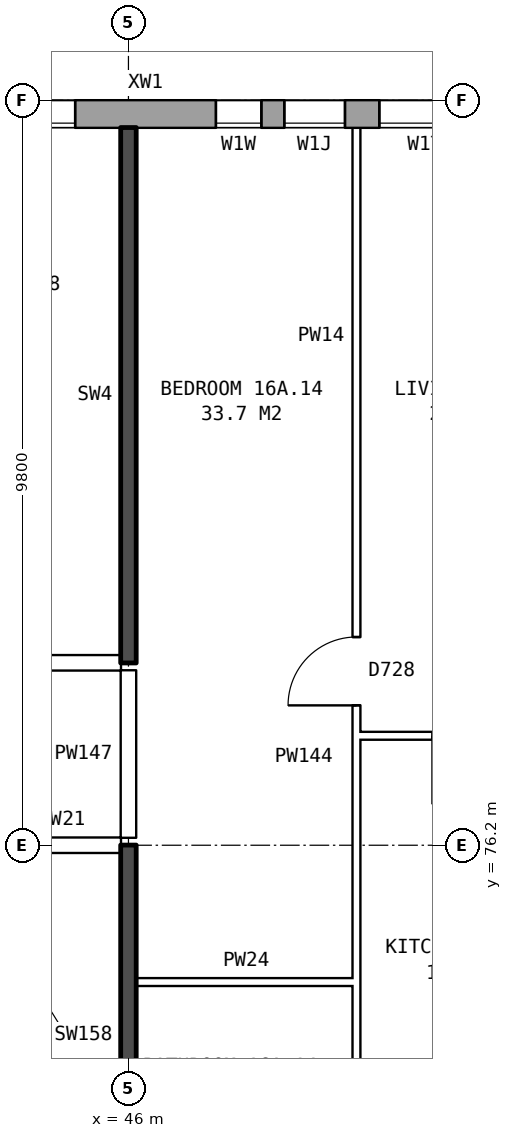
"""IFC4 building model, lengths in metres.
Left out: names, types, materials, properties, quantities, classifications, styles, units other than length and angle.
Written with IfcOpenShell. Run it as: python <this file> out.ifc"""

import sys

from ifc_helpers import new_model, si_unit, direction, frame, frame_2d, origin, place, context, subcontext, project, spatial, rectangle, extrude, element, fill, save


model = new_model("IFC4")
c1 = context("Model", 3, precision=1e-05, world=origin(), true_north=direction((0.0, 1.0)))
c2 = subcontext(c1, "Body", "Model", "MODEL_VIEW")
j1 = project(units=[si_unit("LENGTHUNIT", "METRE"), si_unit("PLANEANGLEUNIT", "RADIAN")], contexts=[c1])
p1 = place(None, origin())
s1 = spatial("IfcSite", under=j1, at=p1, CompositionType="ELEMENT")
p2 = place(p1, origin())
s2 = spatial("IfcBuilding", under=s1, at=p2, CompositionType="ELEMENT")
p3 = place(p2, frame((0.0, 0.0, 59.8)))
s3 = spatial("IfcBuildingStorey", under=s2, at=p3, CompositionType="ELEMENT", Elevation=59.8)
p4 = place(p3, frame((72.925, 85.82, 0.0), z_axis=(0.0, 0.0, 1.0), x_axis=(-1.0, 0.0, 0.0)))
e1 = element("IfcWall", 1, at=p4, inside=s3, PredefinedType="STANDARD", context=c2, shape_type="SweptSolid", body=[
    extrude(rectangle(XDim=48.351, YDim=0.36, at=frame_2d((24.175, 0.0))), origin(), (0.0, 0.0, 1.0), 2.85),
])
p5 = place(p4, frame((0.625, 0.0, 0.8)))
e2 = element("IfcOpeningElement", 2, at=p5, cuts=e1, PredefinedType="OPENING", context=c2, shape_type="SweptSolid", body=[
    extrude(rectangle(XDim=1.6, YDim=1.8, at=frame_2d((0.8, 0.9))), frame((0.0, 0.19, 0.0), z_axis=(0.0, -1.0, 0.0), x_axis=(1.0, 0.0, 0.0)), (0.0, 0.0, 1.0), 0.38),
])
p6 = place(p4, frame((3.625, 0.0, 0.8)))
e3 = element("IfcOpeningElement", 3, at=p6, cuts=e1, PredefinedType="OPENING", context=c2, shape_type="SweptSolid", body=[
    extrude(rectangle(XDim=1.6, YDim=1.8, at=frame_2d((0.8, 0.9))), frame((0.0, 0.19, 0.0), z_axis=(0.0, -1.0, 0.0), x_axis=(1.0, 0.0, 0.0)), (0.0, 0.0, 1.0), 0.38),
])
p7 = place(p4, frame((6.625, 0.0, 0.8)))
e4 = element("IfcOpeningElement", 4, at=p7, cuts=e1, PredefinedType="OPENING", context=c2, shape_type="SweptSolid", body=[
    extrude(rectangle(XDim=1.6, YDim=1.8, at=frame_2d((0.8, 0.9))), frame((0.0, 0.19, 0.0), z_axis=(0.0, -1.0, 0.0), x_axis=(1.0, 0.0, 0.0)), (0.0, 0.0, 1.0), 0.38),
])
p8 = place(p4, frame((9.625, 0.0, 0.8)))
e5 = element("IfcOpeningElement", 5, at=p8, cuts=e1, PredefinedType="OPENING", context=c2, shape_type="SweptSolid", body=[
    extrude(rectangle(XDim=1.6, YDim=1.8, at=frame_2d((0.8, 0.9))), frame((0.0, 0.19, 0.0), z_axis=(0.0, -1.0, 0.0), x_axis=(1.0, 0.0, 0.0)), (0.0, 0.0, 1.0), 0.38),
])
p9 = place(p4, frame((12.625, 0.0, 0.8)))
e6 = element("IfcOpeningElement", 6, at=p9, cuts=e1, PredefinedType="OPENING", context=c2, shape_type="SweptSolid", body=[
    extrude(rectangle(XDim=1.6, YDim=1.8, at=frame_2d((0.8, 0.9))), frame((0.0, 0.19, 0.0), z_axis=(0.0, -1.0, 0.0), x_axis=(1.0, 0.0, 0.0)), (0.0, 0.0, 1.0), 0.38),
])
p10 = place(p4, frame((15.625, 0.0, 0.8)))
e7 = element("IfcOpeningElement", 7, at=p10, cuts=e1, PredefinedType="OPENING", context=c2, shape_type="SweptSolid", body=[
    extrude(rectangle(XDim=1.6, YDim=1.8, at=frame_2d((0.8, 0.9))), frame((0.0, 0.19, 0.0), z_axis=(0.0, -1.0, 0.0), x_axis=(1.0, 0.0, 0.0)), (0.0, 0.0, 1.0), 0.38),
])
p11 = place(p4, frame((18.625, 0.0, 0.8)))
e8 = element("IfcOpeningElement", 8, at=p11, cuts=e1, PredefinedType="OPENING", context=c2, shape_type="SweptSolid", body=[
    extrude(rectangle(XDim=1.6, YDim=1.8, at=frame_2d((0.8, 0.9))), frame((0.0, 0.19, 0.0), z_axis=(0.0, -1.0, 0.0), x_axis=(1.0, 0.0, 0.0)), (0.0, 0.0, 1.0), 0.38),
])
p12 = place(p4, frame((21.125, 0.0, 1.65)))
e9 = element("IfcOpeningElement", 9, at=p12, cuts=e1, PredefinedType="OPENING", context=c2, shape_type="SweptSolid", body=[
    extrude(rectangle(XDim=0.8, YDim=0.9, at=frame_2d((0.4, 0.45))), frame((0.0, 0.19, 0.0), z_axis=(0.0, -1.0, 0.0), x_axis=(1.0, 0.0, 0.0)), (0.0, 0.0, 1.0), 0.38),
])
p13 = place(p4, frame((24.075, 0.0, 0.25)))
e10 = element("IfcOpeningElement", 10, at=p13, cuts=e1, PredefinedType="OPENING", context=c2, shape_type="SweptSolid", body=[
    extrude(rectangle(XDim=0.8, YDim=1.5, at=frame_2d((0.4, 0.75))), frame((0.0, 0.19, 0.0), z_axis=(0.0, -1.0, 0.0), x_axis=(1.0, 0.0, 0.0)), (0.0, 0.0, 1.0), 0.38),
])
p14 = place(p4, frame((27.625, 0.0, 0.8)))
e11 = element("IfcOpeningElement", 11, at=p14, cuts=e1, PredefinedType="OPENING", context=c2, shape_type="SweptSolid", body=[
    extrude(rectangle(XDim=1.6, YDim=1.8, at=frame_2d((0.8, 0.9))), frame((0.0, 0.19, 0.0), z_axis=(0.0, -1.0, 0.0), x_axis=(1.0, 0.0, 0.0)), (0.0, 0.0, 1.0), 0.38),
])
p15 = place(p4, frame((30.625, 0.0, 0.8)))
e12 = element("IfcOpeningElement", 12, at=p15, cuts=e1, PredefinedType="OPENING", context=c2, shape_type="SweptSolid", body=[
    extrude(rectangle(XDim=1.6, YDim=1.8, at=frame_2d((0.8, 0.9))), frame((0.0, 0.19, 0.0), z_axis=(0.0, -1.0, 0.0), x_axis=(1.0, 0.0, 0.0)), (0.0, 0.0, 1.0), 0.38),
])
p16 = place(p4, frame((33.625, 0.0, 0.8)))
e13 = element("IfcOpeningElement", 13, at=p16, cuts=e1, PredefinedType="OPENING", context=c2, shape_type="SweptSolid", body=[
    extrude(rectangle(XDim=1.6, YDim=1.8, at=frame_2d((0.8, 0.9))), frame((0.0, 0.19, 0.0), z_axis=(0.0, -1.0, 0.0), x_axis=(1.0, 0.0, 0.0)), (0.0, 0.0, 1.0), 0.38),
])
p17 = place(p4, frame((36.625, 0.0, 0.8)))
e14 = element("IfcOpeningElement", 14, at=p17, cuts=e1, PredefinedType="OPENING", context=c2, shape_type="SweptSolid", body=[
    extrude(rectangle(XDim=1.6, YDim=1.8, at=frame_2d((0.8, 0.9))), frame((0.0, 0.19, 0.0), z_axis=(0.0, -1.0, 0.0), x_axis=(1.0, 0.0, 0.0)), (0.0, 0.0, 1.0), 0.38),
])
p18 = place(p4, frame((39.625, 0.0, 0.8)))
e15 = element("IfcOpeningElement", 15, at=p18, cuts=e1, PredefinedType="OPENING", context=c2, shape_type="SweptSolid", body=[
    extrude(rectangle(XDim=1.6, YDim=1.8, at=frame_2d((0.8, 0.9))), frame((0.0, 0.19, 0.0), z_axis=(0.0, -1.0, 0.0), x_axis=(1.0, 0.0, 0.0)), (0.0, 0.0, 1.0), 0.38),
])
p19 = place(p4, frame((42.625, 0.0, 0.8)))
e16 = element("IfcOpeningElement", 16, at=p19, cuts=e1, PredefinedType="OPENING", context=c2, shape_type="SweptSolid", body=[
    extrude(rectangle(XDim=1.6, YDim=1.8, at=frame_2d((0.8, 0.9))), frame((0.0, 0.19, 0.0), z_axis=(0.0, -1.0, 0.0), x_axis=(1.0, 0.0, 0.0)), (0.0, 0.0, 1.0), 0.38),
])
p20 = place(p4, frame((45.625, 0.0, 0.8)))
e17 = element("IfcOpeningElement", 17, at=p20, cuts=e1, PredefinedType="OPENING", context=c2, shape_type="SweptSolid", body=[
    extrude(rectangle(XDim=1.6, YDim=1.8, at=frame_2d((0.8, 0.9))), frame((0.0, 0.19, 0.0), z_axis=(0.0, -1.0, 0.0), x_axis=(1.0, 0.0, 0.0)), (0.0, 0.0, 1.0), 0.38),
])
p21 = place(p4, frame((22.425, 0.0, 0.15)))
e18 = element("IfcOpeningElement", 18, at=p21, cuts=e1, PredefinedType="OPENING", context=c2, shape_type="SweptSolid", body=[
    extrude(rectangle(XDim=1.2, YDim=0.9, at=frame_2d((0.6, 0.45))), frame((0.0, 0.19, 0.0), z_axis=(0.0, -1.0, 0.0), x_axis=(1.0, 0.0, 0.0)), (0.0, 0.0, 1.0), 0.38),
])
p22 = place(p4, frame((25.175, 0.0, 0.25)))
e19 = element("IfcOpeningElement", 19, at=p22, cuts=e1, PredefinedType="OPENING", context=c2, shape_type="SweptSolid", body=[
    extrude(rectangle(XDim=0.6, YDim=0.9, at=frame_2d((0.3, 0.45))), frame((0.0, 0.19, 0.0), z_axis=(0.0, -1.0, 0.0), x_axis=(1.0, 0.0, 0.0)), (0.0, 0.0, 1.0), 0.38),
])
p23 = place(p3, frame((46.1, 74.4, 0.0), z_axis=(0.0, 0.0, 1.0), x_axis=(1.0, 0.0, 0.0)))
e20 = element("IfcWall", 20, at=p23, inside=s3, PredefinedType="PARTITIONING", context=c2, shape_type="SweptSolid", body=[
    extrude(rectangle(XDim=2.9, YDim=0.1, at=frame_2d((1.45, 0.0))), origin(), (0.0, 0.0, 1.0), 2.85),
])
p24 = place(p3, frame((44.36, 76.2, 0.0), z_axis=(0.0, 0.0, 1.0), x_axis=(1.0, 0.0, 0.0)))
e21 = element("IfcWall", 21, at=p24, inside=s3, PredefinedType="PARTITIONING", context=c2, shape_type="SweptSolid", body=[
    extrude(rectangle(XDim=1.54, YDim=0.2, at=frame_2d((0.77, 0.0))), origin(), (0.0, 0.0, 1.0), 2.85),
])
p25 = place(p3, frame((49.0, 77.64, 0.0), z_axis=(0.0, 0.0, 1.0), x_axis=(1.0, 0.0, 0.0)))
e22 = element("IfcWall", 22, at=p25, inside=s3, PredefinedType="PARTITIONING", context=c2, shape_type="SweptSolid", body=[
    extrude(rectangle(XDim=2.9, YDim=0.1, at=frame_2d((1.45, 0.0))), origin(), (0.0, 0.0, 1.0), 2.85),
])
p26 = place(p25, frame((1.0, 0.0, 0.0)))
e23 = element("IfcOpeningElement", 23, at=p26, cuts=e22, PredefinedType="OPENING", context=c2, shape_type="SweptSolid", body=[
    extrude(rectangle(XDim=0.9, YDim=2.1, at=frame_2d((0.45, 1.05))), frame((0.0, 0.06, 0.0), z_axis=(0.0, -1.0, 0.0), x_axis=(1.0, 0.0, 0.0)), (0.0, 0.0, 1.0), 0.12),
])
p27 = place(p3, frame((21.86, 78.6, 0.0), z_axis=(0.0, 0.0, 1.0), x_axis=(1.0, 0.0, 0.0)))
e24 = element("IfcWall", 24, at=p27, inside=s3, PredefinedType="PARTITIONING", context=c2, shape_type="SweptSolid", body=[
    extrude(rectangle(XDim=24.04, YDim=0.2, at=frame_2d((12.02, 0.0))), origin(), (0.0, 0.0, 1.0), 2.85),
])
p28 = place(p27, frame((20.59, 0.0, 0.0)))
e25 = element("IfcOpeningElement", 25, at=p28, cuts=e24, PredefinedType="OPENING", context=c2, shape_type="SweptSolid", body=[
    extrude(rectangle(XDim=1.0, YDim=2.1, at=frame_2d((0.5, 1.05))), frame((0.0, 0.11, 0.0), z_axis=(0.0, -1.0, 0.0), x_axis=(1.0, 0.0, 0.0)), (0.0, 0.0, 1.0), 0.22),
])
p29 = place(p27, frame((8.64, 0.0, 0.0)))
e26 = element("IfcOpeningElement", 26, at=p29, cuts=e24, PredefinedType="OPENING", context=c2, shape_type="SweptSolid", body=[
    extrude(rectangle(XDim=1.0, YDim=2.1, at=frame_2d((0.5, 1.05))), frame((0.0, 0.11, 0.0), z_axis=(0.0, -1.0, 0.0), x_axis=(1.0, 0.0, 0.0)), (0.0, 0.0, 1.0), 0.22),
])
p30 = place(p27, frame((3.64, 0.0, 0.0)))
e27 = element("IfcOpeningElement", 27, at=p30, cuts=e24, PredefinedType="OPENING", context=c2, shape_type="SweptSolid", body=[
    extrude(rectangle(XDim=1.0, YDim=2.1, at=frame_2d((0.5, 1.05))), frame((0.0, 0.11, 0.0), z_axis=(0.0, -1.0, 0.0), x_axis=(1.0, 0.0, 0.0)), (0.0, 0.0, 1.0), 0.22),
])
p31 = place(p3, frame((46.0, 71.2, 0.0), z_axis=(0.0, 0.0, 1.0), x_axis=(0.0, 1.0, 0.0)))
e28 = element("IfcWall", 28, at=p31, inside=s3, PredefinedType="SOLIDWALL", context=c2, shape_type="SweptSolid", body=[
    extrude(rectangle(XDim=5.0, YDim=0.2, at=frame_2d((2.5, 0.0))), origin(), (0.0, 0.0, 1.0), 2.85),
])
p32 = place(p3, frame((46.0, 76.3, 0.0), z_axis=(0.0, 0.0, 1.0), x_axis=(0.0, 1.0, 0.0)))
e29 = element("IfcWall", 29, at=p32, inside=s3, PredefinedType="PARTITIONING", context=c2, shape_type="SweptSolid", body=[
    extrude(rectangle(XDim=2.2, YDim=0.2, at=frame_2d((1.1, 0.0))), origin(), (0.0, 0.0, 1.0), 2.85),
])
p33 = place(p3, frame((46.0, 78.6, 0.0), z_axis=(0.0, 0.0, 1.0), x_axis=(0.0, 1.0, 0.0)))
e30 = element("IfcWall", 30, at=p33, inside=s3, PredefinedType="SOLIDWALL", context=c2, shape_type="SweptSolid", body=[
    extrude(rectangle(XDim=7.04, YDim=0.2, at=frame_2d((3.52, 0.0))), origin(), (0.0, 0.0, 1.0), 2.85),
])
p34 = place(p3, frame((49.0, 71.3, 0.0), z_axis=(0.0, 0.0, 1.0), x_axis=(0.0, 1.0, 0.0)))
e31 = element("IfcWall", 31, at=p34, inside=s3, PredefinedType="PARTITIONING", context=c2, shape_type="SweptSolid", body=[
    extrude(rectangle(XDim=14.34, YDim=0.1, at=frame_2d((7.17, 0.0))), origin(), (0.0, 0.0, 1.0), 2.85),
])
p35 = place(p34, frame((6.74, 0.0, 0.0)))
e32 = element("IfcOpeningElement", 32, at=p35, cuts=e31, PredefinedType="OPENING", context=c2, shape_type="SweptSolid", body=[
    extrude(rectangle(XDim=0.9, YDim=2.1, at=frame_2d((0.45, 1.05))), frame((0.0, 0.06, 0.0), z_axis=(0.0, -1.0, 0.0), x_axis=(1.0, 0.0, 0.0)), (0.0, 0.0, 1.0), 0.12),
])
p36 = place(p34, frame((0.4, 0.0, 0.0)))
e33 = element("IfcOpeningElement", 33, at=p36, cuts=e31, PredefinedType="OPENING", context=c2, shape_type="SweptSolid", body=[
    extrude(rectangle(XDim=0.9, YDim=2.1, at=frame_2d((0.45, 1.05))), frame((0.0, 0.06, 0.0), z_axis=(0.0, -1.0, 0.0), x_axis=(1.0, 0.0, 0.0)), (0.0, 0.0, 1.0), 0.12),
])
p37 = place(p13, origin())
e34 = element("IfcWindow", 34, at=p37, inside=s3, PartitioningType="SINGLE_PANEL", PredefinedType="WINDOW", context=c2, shape_type="SweptSolid", body=[
    extrude(rectangle(XDim=0.8, YDim=1.5, at=frame_2d((0.4, 0.75))), frame((0.0, 0.15, 0.0), z_axis=(0.0, -1.0, 0.0), x_axis=(1.0, 0.0, 0.0)), (0.0, 0.0, 1.0), 0.06),
])
fill(e10, e34)
p38 = place(p14, origin())
e35 = element("IfcWindow", 35, at=p38, inside=s3, PartitioningType="SINGLE_PANEL", PredefinedType="WINDOW", context=c2, shape_type="SweptSolid", body=[
    extrude(rectangle(XDim=1.6, YDim=1.8, at=frame_2d((0.8, 0.9))), frame((0.0, 0.15, 0.0), z_axis=(0.0, -1.0, 0.0), x_axis=(1.0, 0.0, 0.0)), (0.0, 0.0, 1.0), 0.06),
])
fill(e11, e35)
p39 = place(p35, origin())
e36 = element("IfcDoor", 36, at=p39, inside=s3, OperationType="SINGLE_SWING_LEFT", PredefinedType="DOOR", context=c2, shape_type="SweptSolid", body=[
    extrude(rectangle(XDim=0.9, YDim=2.1, at=frame_2d((0.45, 1.05))), frame((0.0, 0.025, 0.0), z_axis=(0.0, -1.0, 0.0), x_axis=(1.0, 0.0, 0.0)), (0.0, 0.0, 1.0), 0.05),
])
fill(e32, e36)
p40 = place(p21, origin())
e37 = element("IfcWindow", 37, at=p40, inside=s3, PartitioningType="SINGLE_PANEL", PredefinedType="WINDOW", context=c2, shape_type="SweptSolid", body=[
    extrude(rectangle(XDim=1.2, YDim=0.9, at=frame_2d((0.6, 0.45))), frame((0.0, 0.15, 0.0), z_axis=(0.0, -1.0, 0.0), x_axis=(1.0, 0.0, 0.0)), (0.0, 0.0, 1.0), 0.06),
])
fill(e18, e37)
p41 = place(p22, origin())
e38 = element("IfcWindow", 38, at=p41, inside=s3, PartitioningType="SINGLE_PANEL", PredefinedType="WINDOW", context=c2, shape_type="SweptSolid", body=[
    extrude(rectangle(XDim=0.6, YDim=0.9, at=frame_2d((0.3, 0.45))), frame((0.0, 0.15, 0.0), z_axis=(0.0, -1.0, 0.0), x_axis=(1.0, 0.0, 0.0)), (0.0, 0.0, 1.0), 0.06),
])
fill(e19, e38)
save(model, sys.argv[1])
